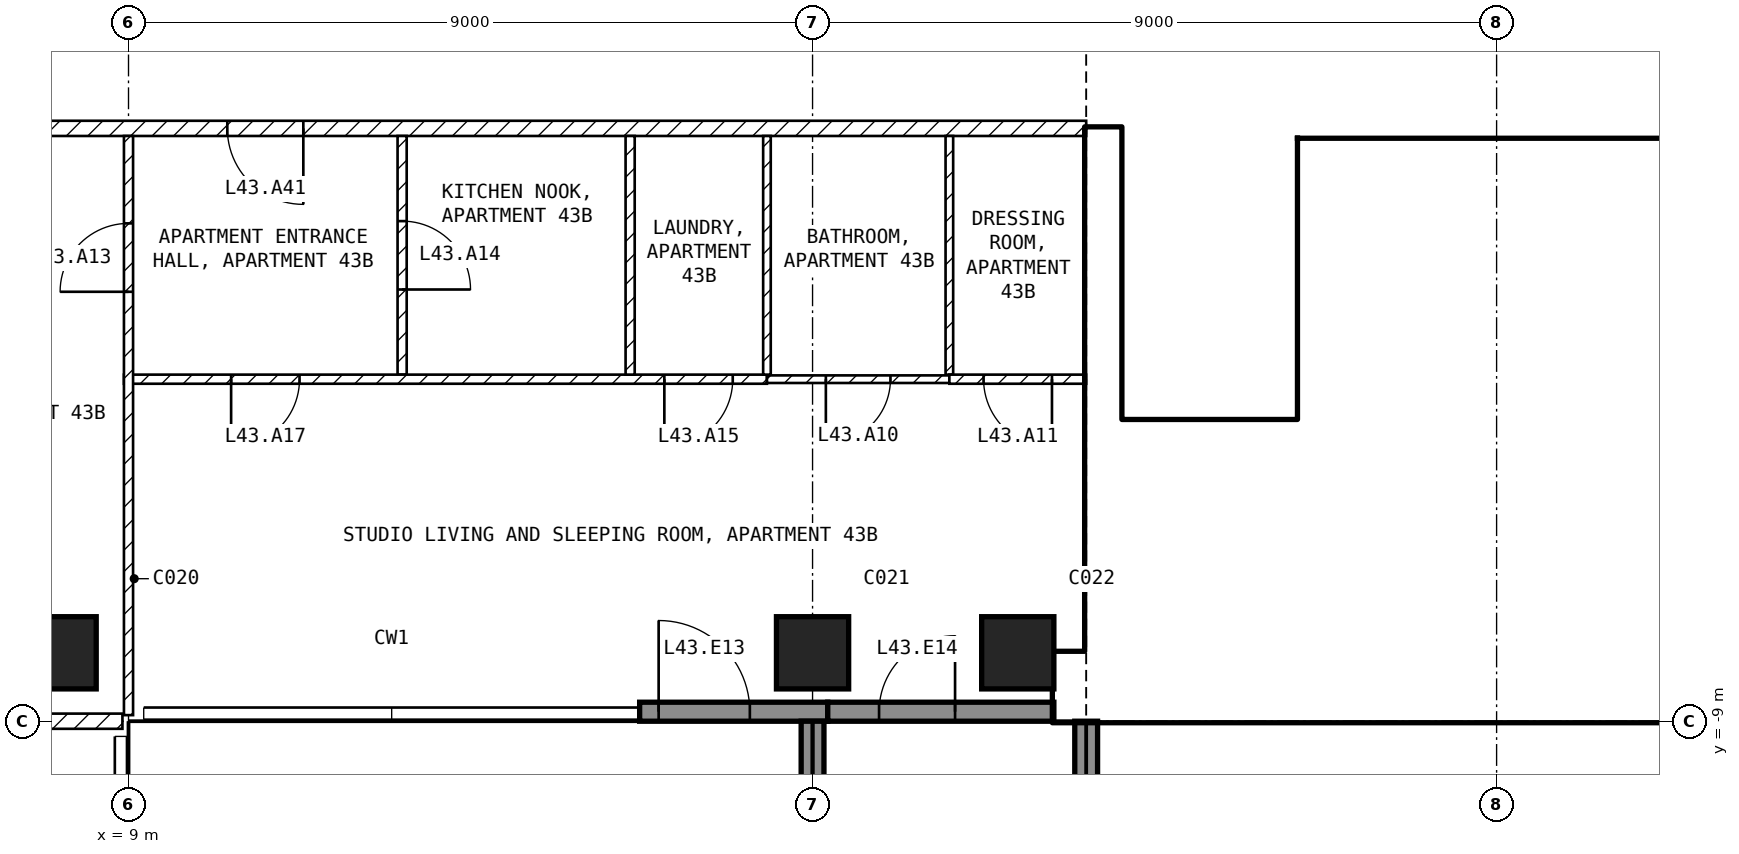
"""IFC4 building model, lengths in metres.
Left out: names, types, materials, properties, quantities, classifications, styles, units other than length and angle.
Written with IfcOpenShell. Run it as: python <this file> out.ifc"""

import sys

from ifc_helpers import new_model, si_unit, direction, frame, frame_2d, origin, origin_2d, place, context, subcontext, project, spatial, rectangle, extrude, element, fill, save


model = new_model("IFC4")
c1 = context("Model", 3, precision=1e-05, world=origin(), true_north=direction((0.0, 1.0)))
c2 = subcontext(c1, "Body", "Model", "MODEL_VIEW")
j1 = project(units=[si_unit("LENGTHUNIT", "METRE"), si_unit("PLANEANGLEUNIT", "RADIAN")], contexts=[c1])
p1 = place(None, origin())
s1 = spatial("IfcSite", under=j1, at=p1, CompositionType="ELEMENT")
p2 = place(p1, origin())
s2 = spatial("IfcBuilding", under=s1, at=p2, CompositionType="ELEMENT")
p3 = place(p2, frame((0.0, 0.0, 177.1)))
s3 = spatial("IfcBuildingStorey", under=s2, at=p3, CompositionType="ELEMENT", Elevation=177.1)
for number, where, z_axis, x_axis in (
    (1, (8.1, -8.1, -0.25), (0.0, 0.0, 1.0), (1.0, 0.0, 0.0)),
    (2, (18.0, -8.1, -0.25), (0.0, 0.0, 1.0), (1.0, 0.0, 0.0)),
    (3, (20.7, -8.1, -0.25), (0.0, 0.0, 1.0), (1.0, 0.0, 0.0)),
):
    element("IfcColumn", number, at=place(p3, frame(where, z_axis=z_axis, x_axis=x_axis)), inside=s3, PredefinedType="COLUMN", context=c2, shape_type="SweptSolid", body=[
        extrude(rectangle(XDim=0.95, YDim=0.95, at=origin_2d()), origin(), (0.0, 0.0, 1.0), 3.5),
    ])
p4 = place(p3, frame((15.725, -8.875, 0.0), z_axis=(0.0, 0.0, 1.0), x_axis=(1.0, 0.0, 0.0)))
e4 = element("IfcWall", 4, at=p4, inside=s3, PredefinedType="SOLIDWALL", context=c2, shape_type="SweptSolid", body=[
    extrude(rectangle(XDim=2.475, YDim=0.25, at=frame_2d((1.237, 0.0))), origin(), (0.0, 0.0, 1.0), 3.25),
])
p5 = place(p4, frame((0.25, 0.0, 0.0)))
e5 = element("IfcOpeningElement", 5, at=p5, cuts=e4, PredefinedType="OPENING", context=c2, shape_type="SweptSolid", body=[
    extrude(rectangle(XDim=1.2, YDim=2.4, at=frame_2d((0.6, 1.2))), frame((0.0, 0.135, 0.0), z_axis=(0.0, -1.0, 0.0), x_axis=(1.0, 0.0, 0.0)), (0.0, 0.0, 1.0), 0.27),
])
p6 = place(p3, frame((18.2, -8.875, 0.0), z_axis=(0.0, 0.0, 1.0), x_axis=(1.0, 0.0, 0.0)))
e6 = element("IfcWall", 6, at=p6, inside=s3, PredefinedType="SOLIDWALL", context=c2, shape_type="SweptSolid", body=[
    extrude(rectangle(XDim=2.975, YDim=0.25, at=frame_2d((1.488, 0.0))), origin(), (0.0, 0.0, 1.0), 3.25),
])
p7 = place(p6, frame((0.675, 0.0, 0.0)))
e7 = element("IfcOpeningElement", 7, at=p7, cuts=e6, PredefinedType="OPENING", context=c2, shape_type="SweptSolid", body=[
    extrude(rectangle(XDim=1.0, YDim=2.4, at=frame_2d((0.5, 1.2))), frame((0.0, 0.135, 0.0), z_axis=(0.0, -1.0, 0.0), x_axis=(1.0, 0.0, 0.0)), (0.0, 0.0, 1.0), 0.27),
])
for number, where, z_axis, x_axis in (
    (8, (18.0, -9.0, 0.0), (0.0, 0.0, 1.0), (0.0, -1.0, 0.0)),
    (9, (21.6, -9.0, 0.0), (0.0, 0.0, 1.0), (0.0, -1.0, 0.0)),
):
    element("IfcWall", number, at=place(p3, frame(where, z_axis=z_axis, x_axis=x_axis)), inside=s3, PredefinedType="SOLIDWALL", context=c2, shape_type="SweptSolid", body=[
        extrude(rectangle(XDim=2.7, YDim=0.3, at=frame_2d((1.35, 0.0))), origin(), (0.0, 0.0, 1.0), 3.25),
    ])
p8 = place(p3, frame((21.175, -8.55, 0.0), z_axis=(0.0, 0.0, 1.0), x_axis=(1.0, 0.0, 0.0)))
e10 = element("IfcWall", 10, at=p8, inside=s3, PredefinedType="SHEAR", context=c2, shape_type="SweptSolid", body=[
    extrude(rectangle(XDim=9.025, YDim=0.9, at=frame_2d((4.512, 0.0))), origin(), (0.0, 0.0, 1.0), 3.25),
])
p9 = place(p3, frame((21.825, -8.1, 0.0), z_axis=(0.0, 0.0, 1.0), x_axis=(0.0, 1.0, 0.0)))
e11 = element("IfcWall", 11, at=p9, inside=s3, PredefinedType="SHEAR", context=c2, shape_type="SweptSolid", body=[
    extrude(rectangle(XDim=6.9, YDim=0.45, at=frame_2d((3.45, 0.0))), origin(), (0.0, 0.0, 1.0), 3.25),
])
p10 = place(p3, frame((24.5, -5.05, 0.0), z_axis=(0.0, 0.0, 1.0), x_axis=(0.0, 1.0, 0.0)))
e12 = element("IfcWall", 12, at=p10, inside=s3, PredefinedType="SOLIDWALL", context=c2, shape_type="SweptSolid", body=[
    extrude(rectangle(XDim=3.7, YDim=0.2, at=frame_2d((1.85, 0.0))), origin(), (0.0, 0.0, 1.0), 3.25),
])
p11 = place(p10, frame((0.1, 0.0, 0.0)))
e13 = element("IfcOpeningElement", 13, at=p11, cuts=e12, PredefinedType="OPENING", context=c2, shape_type="SweptSolid", body=[
    extrude(rectangle(XDim=0.8, YDim=2.1, at=frame_2d((0.4, 1.05))), frame((0.0, 0.11, 0.0), z_axis=(0.0, -1.0, 0.0), x_axis=(1.0, 0.0, 0.0)), (0.0, 0.0, 1.0), 0.22),
])
p12 = place(p3, frame((22.05, -5.15, 0.0), z_axis=(0.0, 0.0, 1.0), x_axis=(1.0, 0.0, 0.0)))
e14 = element("IfcWall", 14, at=p12, inside=s3, PredefinedType="SOLIDWALL", context=c2, shape_type="SweptSolid", body=[
    extrude(rectangle(XDim=6.3, YDim=0.2, at=frame_2d((3.15, 0.0))), origin(), (0.0, 0.0, 1.0), 3.25),
])
p13 = place(p12, frame((0.2, 0.0, 0.0)))
e15 = element("IfcOpeningElement", 15, at=p13, cuts=e14, PredefinedType="OPENING", context=c2, shape_type="SweptSolid", body=[
    extrude(rectangle(XDim=1.0, YDim=2.1, at=frame_2d((0.5, 1.05))), frame((0.0, 0.11, 0.0), z_axis=(0.0, -1.0, 0.0), x_axis=(1.0, 0.0, 0.0)), (0.0, 0.0, 1.0), 0.22),
])
p14 = place(p3, frame((28.25, -8.1, 0.0), z_axis=(0.0, 0.0, 1.0), x_axis=(0.0, 1.0, 0.0)))
e16 = element("IfcWall", 16, at=p14, inside=s3, PredefinedType="SOLIDWALL", context=c2, shape_type="SweptSolid", body=[
    extrude(rectangle(XDim=2.85, YDim=0.2, at=frame_2d((1.425, 0.0))), origin(), (0.0, 0.0, 1.0), 3.25),
])
p15 = place(p3, frame((24.6, -1.45, 0.0), z_axis=(0.0, 0.0, 1.0), x_axis=(1.0, 0.0, 0.0)))
e17 = element("IfcWall", 17, at=p15, inside=s3, PredefinedType="SOLIDWALL", context=c2, shape_type="SweptSolid", body=[
    extrude(rectangle(XDim=8.6, YDim=0.2, at=frame_2d((4.3, 0.0))), origin(), (0.0, 0.0, 1.0), 3.25),
])
p16 = place(p15, frame((0.4, 0.0, 0.0)))
e18 = element("IfcOpeningElement", 18, at=p16, cuts=e17, PredefinedType="OPENING", context=c2, shape_type="SweptSolid", body=[
    extrude(rectangle(XDim=1.0, YDim=2.1, at=frame_2d((0.5, 1.05))), frame((0.0, 0.11, 0.0), z_axis=(0.0, -1.0, 0.0), x_axis=(1.0, 0.0, 0.0)), (0.0, 0.0, 1.0), 0.22),
])
p17 = place(p15, frame((2.4, 0.0, 0.0)))
e19 = element("IfcOpeningElement", 19, at=p17, cuts=e17, PredefinedType="OPENING", context=c2, shape_type="SweptSolid", body=[
    extrude(rectangle(XDim=1.0, YDim=2.1, at=frame_2d((0.5, 1.05))), frame((0.0, 0.11, 0.0), z_axis=(0.0, -1.0, 0.0), x_axis=(1.0, 0.0, 0.0)), (0.0, 0.0, 1.0), 0.22),
])
p18 = place(p15, frame((4.4, 0.0, 0.0)))
e20 = element("IfcOpeningElement", 20, at=p18, cuts=e17, PredefinedType="OPENING", context=c2, shape_type="SweptSolid", body=[
    extrude(rectangle(XDim=1.0, YDim=2.1, at=frame_2d((0.5, 1.05))), frame((0.0, 0.11, 0.0), z_axis=(0.0, -1.0, 0.0), x_axis=(1.0, 0.0, 0.0)), (0.0, 0.0, 1.0), 0.22),
])
p19 = place(p15, frame((6.85, 0.0, 0.0)))
e21 = element("IfcOpeningElement", 21, at=p19, cuts=e17, PredefinedType="OPENING", context=c2, shape_type="SweptSolid", body=[
    extrude(rectangle(XDim=0.9, YDim=2.1, at=frame_2d((0.45, 1.05))), frame((0.0, 0.11, 0.0), z_axis=(0.0, -1.0, 0.0), x_axis=(1.0, 0.0, 0.0)), (0.0, 0.0, 1.0), 0.22),
])
p20 = place(p3, frame((24.6, -3.95, 0.0), z_axis=(0.0, 0.0, 1.0), x_axis=(1.0, 0.0, 0.0)))
e22 = element("IfcWall", 22, at=p20, inside=s3, PredefinedType="SOLIDWALL", context=c2, shape_type="SweptSolid", body=[
    extrude(rectangle(XDim=8.6, YDim=0.2, at=frame_2d((4.3, 0.0))), origin(), (0.0, 0.0, 1.0), 3.25),
])
for number, where, z_axis, x_axis in (
    (23, (26.5, -3.85, 0.0), (0.0, 0.0, 1.0), (0.0, 1.0, 0.0)),
    (24, (28.5, -3.85, 0.0), (0.0, 0.0, 1.0), (0.0, 1.0, 0.0)),
):
    element("IfcWall", number, at=place(p3, frame(where, z_axis=z_axis, x_axis=x_axis)), inside=s3, PredefinedType="SOLIDWALL", context=c2, shape_type="SweptSolid", body=[
        extrude(rectangle(XDim=2.3, YDim=0.2, at=frame_2d((1.15, 0.0))), origin(), (0.0, 0.0, 1.0), 3.25),
    ])
p21 = place(p3, frame((27.4, -5.05, 0.0), z_axis=(0.0, 0.0, 1.0), x_axis=(0.0, 1.0, 0.0)))
e25 = element("IfcWall", 25, at=p21, inside=s3, PredefinedType="PARTITIONING", context=c2, shape_type="SweptSolid", body=[
    extrude(rectangle(XDim=1.0, YDim=0.15, at=frame_2d((0.5, 0.0))), origin(), (0.0, 0.0, 1.0), 3.25),
])
p22 = place(p21, frame((0.1, 0.0, 0.0)))
e26 = element("IfcOpeningElement", 26, at=p22, cuts=e25, PredefinedType="OPENING", context=c2, shape_type="SweptSolid", body=[
    extrude(rectangle(XDim=0.8, YDim=2.1, at=frame_2d((0.4, 1.05))), frame((0.0, 0.085, 0.0), z_axis=(0.0, -1.0, 0.0), x_axis=(1.0, 0.0, 0.0)), (0.0, 0.0, 1.0), 0.17),
])
p23 = place(p3, frame((21.6, -1.2, 0.0), z_axis=(0.0, 0.0, 1.0), x_axis=(-1.0, 0.0, 0.0)))
e27 = element("IfcWall", 27, at=p23, inside=s3, PredefinedType="PARTITIONING", context=c2, shape_type="SweptSolid", body=[
    extrude(rectangle(XDim=17.2, YDim=0.2, at=frame_2d((8.6, 0.0))), origin(), (0.0, 0.0, 1.0), 3.25),
])
p24 = place(p23, frame((10.3, 0.0, 0.0)))
e28 = element("IfcOpeningElement", 28, at=p24, cuts=e27, PredefinedType="OPENING", context=c2, shape_type="SweptSolid", body=[
    extrude(rectangle(XDim=1.0, YDim=2.1, at=frame_2d((0.5, 1.05))), frame((0.0, 0.11, 0.0), z_axis=(0.0, -1.0, 0.0), x_axis=(1.0, 0.0, 0.0)), (0.0, 0.0, 1.0), 0.22),
])
p25 = place(p3, frame((8.92, -9.0, 0.0), z_axis=(0.0, 0.0, 1.0), x_axis=(-1.0, 0.0, 0.0)))
e29 = element("IfcWall", 29, at=p25, inside=s3, PredefinedType="PARTITIONING", context=c2, shape_type="SweptSolid", body=[
    extrude(rectangle(XDim=17.84, YDim=0.2, at=frame_2d((8.92, 0.0))), origin(), (0.0, 0.0, 1.0), 3.25),
])
p26 = place(p25, frame((8.42, 0.0, 0.0)))
e30 = element("IfcOpeningElement", 30, at=p26, cuts=e29, PredefinedType="OPENING", context=c2, shape_type="SweptSolid", body=[
    extrude(rectangle(XDim=1.0, YDim=2.1, at=frame_2d((0.5, 1.05))), frame((0.0, 0.11, 0.0), z_axis=(0.0, -1.0, 0.0), x_axis=(1.0, 0.0, 0.0)), (0.0, 0.0, 1.0), 0.22),
])
p27 = place(p3, frame((12.6, -1.3, 0.0), z_axis=(0.0, 0.0, 1.0), x_axis=(0.0, -1.0, 0.0)))
e31 = element("IfcWall", 31, at=p27, inside=s3, PredefinedType="PARTITIONING", context=c2, shape_type="SweptSolid", body=[
    extrude(rectangle(XDim=3.14, YDim=0.12, at=frame_2d((1.57, 0.0))), origin(), (0.0, 0.0, 1.0), 3.25),
])
p28 = place(p27, frame((1.12, 0.0, 0.0)))
e32 = element("IfcOpeningElement", 32, at=p28, cuts=e31, PredefinedType="OPENING", context=c2, shape_type="SweptSolid", body=[
    extrude(rectangle(XDim=0.9, YDim=2.1, at=frame_2d((0.45, 1.05))), frame((0.0, 0.07, 0.0), z_axis=(0.0, -1.0, 0.0), x_axis=(1.0, 0.0, 0.0)), (0.0, 0.0, 1.0), 0.14),
])
p29 = place(p3, frame((17.4, -4.5, 0.0), z_axis=(0.0, 0.0, 1.0), x_axis=(-1.0, 0.0, 0.0)))
e33 = element("IfcWall", 33, at=p29, inside=s3, PredefinedType="PARTITIONING", context=c2, shape_type="SweptSolid", body=[
    extrude(rectangle(XDim=8.46, YDim=0.12, at=frame_2d((4.23, 0.0))), origin(), (0.0, 0.0, 1.0), 3.25),
])
p30 = place(p29, frame((0.45, 0.0, 0.0)))
e34 = element("IfcOpeningElement", 34, at=p30, cuts=e33, PredefinedType="OPENING", context=c2, shape_type="SweptSolid", body=[
    extrude(rectangle(XDim=0.9, YDim=2.1, at=frame_2d((0.45, 1.05))), frame((0.0, 0.07, 0.0), z_axis=(0.0, -1.0, 0.0), x_axis=(1.0, 0.0, 0.0)), (0.0, 0.0, 1.0), 0.14),
])
p31 = place(p29, frame((6.15, 0.0, 0.0)))
e35 = element("IfcOpeningElement", 35, at=p31, cuts=e33, PredefinedType="OPENING", context=c2, shape_type="SweptSolid", body=[
    extrude(rectangle(XDim=0.9, YDim=2.1, at=frame_2d((0.45, 1.05))), frame((0.0, 0.07, 0.0), z_axis=(0.0, -1.0, 0.0), x_axis=(1.0, 0.0, 0.0)), (0.0, 0.0, 1.0), 0.14),
])
p32 = place(p3, frame((9.0, -8.92, 0.0), z_axis=(0.0, 0.0, 1.0), x_axis=(0.0, 1.0, 0.0)))
e36 = element("IfcWall", 36, at=p32, inside=s3, PredefinedType="PARTITIONING", context=c2, shape_type="SweptSolid", body=[
    extrude(rectangle(XDim=7.62, YDim=0.12, at=frame_2d((3.81, 0.0))), origin(), (0.0, 0.0, 1.0), 3.25),
])
p33 = place(p32, frame((5.57, 0.0, 0.0)))
e37 = element("IfcOpeningElement", 37, at=p33, cuts=e36, PredefinedType="OPENING", context=c2, shape_type="SweptSolid", body=[
    extrude(rectangle(XDim=0.9, YDim=2.1, at=frame_2d((0.45, 1.05))), frame((0.0, 0.07, 0.0), z_axis=(0.0, -1.0, 0.0), x_axis=(1.0, 0.0, 0.0)), (0.0, 0.0, 1.0), 0.14),
])
p34 = place(p3, frame((15.6, -1.3, 0.0), z_axis=(0.0, 0.0, 1.0), x_axis=(0.0, -1.0, 0.0)))
e38 = element("IfcWall", 38, at=p34, inside=s3, PredefinedType="PARTITIONING", context=c2, shape_type="SweptSolid", body=[
    extrude(rectangle(XDim=3.14, YDim=0.12, at=frame_2d((1.57, 0.0))), origin(), (0.0, 0.0, 1.0), 3.25),
])
for number, where, z_axis, x_axis in (
    (39, (17.4, -1.3, 0.0), (0.0, 0.0, 1.0), (0.0, -1.0, 0.0)),
    (40, (19.8, -1.3, 0.0), (0.0, 0.0, 1.0), (0.0, -1.0, 0.0)),
):
    element("IfcWall", number, at=place(p3, frame(where, z_axis=z_axis, x_axis=x_axis)), inside=s3, PredefinedType="PARTITIONING", context=c2, shape_type="SweptSolid", body=[
        extrude(rectangle(XDim=3.14, YDim=0.1, at=frame_2d((1.57, 0.0))), origin(), (0.0, 0.0, 1.0), 3.25),
    ])
p35 = place(p3, frame((19.8, -4.5, 0.0), z_axis=(0.0, 0.0, 1.0), x_axis=(-1.0, 0.0, 0.0)))
e41 = element("IfcWall", 41, at=p35, inside=s3, PredefinedType="PARTITIONING", context=c2, shape_type="SweptSolid", body=[
    extrude(rectangle(XDim=2.4, YDim=0.1, at=frame_2d((1.2, 0.0))), origin(), (0.0, 0.0, 1.0), 3.25),
])
p36 = place(p35, frame((0.775, 0.0, 0.0)))
e42 = element("IfcOpeningElement", 42, at=p36, cuts=e41, PredefinedType="OPENING", context=c2, shape_type="SweptSolid", body=[
    extrude(rectangle(XDim=0.85, YDim=2.1, at=frame_2d((0.425, 1.05))), frame((0.0, 0.06, 0.0), z_axis=(0.0, -1.0, 0.0), x_axis=(1.0, 0.0, 0.0)), (0.0, 0.0, 1.0), 0.12),
])
p37 = place(p3, frame((21.6, -4.5, 0.0), z_axis=(0.0, 0.0, 1.0), x_axis=(-1.0, 0.0, 0.0)))
e43 = element("IfcWall", 43, at=p37, inside=s3, PredefinedType="PARTITIONING", context=c2, shape_type="SweptSolid", body=[
    extrude(rectangle(XDim=1.8, YDim=0.12, at=frame_2d((0.9, 0.0))), origin(), (0.0, 0.0, 1.0), 3.25),
])
p38 = place(p37, frame((0.45, 0.0, 0.0)))
e44 = element("IfcOpeningElement", 44, at=p38, cuts=e43, PredefinedType="OPENING", context=c2, shape_type="SweptSolid", body=[
    extrude(rectangle(XDim=0.9, YDim=2.1, at=frame_2d((0.45, 1.05))), frame((0.0, 0.07, 0.0), z_axis=(0.0, -1.0, 0.0), x_axis=(1.0, 0.0, 0.0)), (0.0, 0.0, 1.0), 0.14),
])
p39 = place(p5, origin())
e45 = element("IfcDoor", 45, at=p39, inside=s3, OperationType="SINGLE_SWING_LEFT", PredefinedType="DOOR", context=c2, shape_type="SweptSolid", body=[
    extrude(rectangle(XDim=1.2, YDim=2.4, at=frame_2d((0.6, 1.2))), frame((0.0, 0.025, 0.0), z_axis=(0.0, -1.0, 0.0), x_axis=(1.0, 0.0, 0.0)), (0.0, 0.0, 1.0), 0.05),
])
fill(e5, e45)
p40 = place(p7, origin())
e46 = element("IfcDoor", 46, at=p40, inside=s3, OperationType="SINGLE_SWING_RIGHT", PredefinedType="DOOR", context=c2, shape_type="SweptSolid", body=[
    extrude(rectangle(XDim=1.0, YDim=2.4, at=frame_2d((0.5, 1.2))), frame((0.0, 0.025, 0.0), z_axis=(0.0, -1.0, 0.0), x_axis=(1.0, 0.0, 0.0)), (0.0, 0.0, 1.0), 0.05),
])
fill(e7, e46)
p41 = place(p16, origin())
e47 = element("IfcDoor", 47, at=p41, inside=s3, OperationType="DOUBLE_DOOR_SLIDING", PredefinedType="DOOR", context=c2, shape_type="SweptSolid", body=[
    extrude(rectangle(XDim=1.0, YDim=2.1, at=frame_2d((0.5, 1.05))), frame((0.0, 0.025, 0.0), z_axis=(0.0, -1.0, 0.0), x_axis=(1.0, 0.0, 0.0)), (0.0, 0.0, 1.0), 0.05),
])
fill(e18, e47)
p42 = place(p17, origin())
e48 = element("IfcDoor", 48, at=p42, inside=s3, OperationType="DOUBLE_DOOR_SLIDING", PredefinedType="DOOR", context=c2, shape_type="SweptSolid", body=[
    extrude(rectangle(XDim=1.0, YDim=2.1, at=frame_2d((0.5, 1.05))), frame((0.0, 0.025, 0.0), z_axis=(0.0, -1.0, 0.0), x_axis=(1.0, 0.0, 0.0)), (0.0, 0.0, 1.0), 0.05),
])
fill(e19, e48)
p43 = place(p18, origin())
e49 = element("IfcDoor", 49, at=p43, inside=s3, OperationType="DOUBLE_DOOR_SLIDING", PredefinedType="DOOR", context=c2, shape_type="SweptSolid", body=[
    extrude(rectangle(XDim=1.0, YDim=2.1, at=frame_2d((0.5, 1.05))), frame((0.0, 0.025, 0.0), z_axis=(0.0, -1.0, 0.0), x_axis=(1.0, 0.0, 0.0)), (0.0, 0.0, 1.0), 0.05),
])
fill(e20, e49)
p44 = place(p13, origin())
e50 = element("IfcDoor", 50, at=p44, inside=s3, OperationType="SINGLE_SWING_LEFT", PredefinedType="DOOR", context=c2, shape_type="SweptSolid", body=[
    extrude(rectangle(XDim=1.0, YDim=2.1, at=frame_2d((0.5, 1.05))), frame((0.0, 0.025, 0.0), z_axis=(0.0, -1.0, 0.0), x_axis=(1.0, 0.0, 0.0)), (0.0, 0.0, 1.0), 0.05),
])
fill(e15, e50)
p45 = place(p11, origin())
e51 = element("IfcDoor", 51, at=p45, inside=s3, OperationType="SINGLE_SWING_LEFT", PredefinedType="DOOR", context=c2, shape_type="SweptSolid", body=[
    extrude(rectangle(XDim=0.8, YDim=2.1, at=frame_2d((0.4, 1.05))), frame((0.0, 0.025, 0.0), z_axis=(0.0, -1.0, 0.0), x_axis=(1.0, 0.0, 0.0)), (0.0, 0.0, 1.0), 0.05),
])
fill(e13, e51)
p46 = place(p22, origin())
e52 = element("IfcDoor", 52, at=p46, inside=s3, OperationType="SINGLE_SWING_LEFT", PredefinedType="DOOR", context=c2, shape_type="SweptSolid", body=[
    extrude(rectangle(XDim=0.8, YDim=2.1, at=frame_2d((0.4, 1.05))), frame((0.0, 0.025, 0.0), z_axis=(0.0, -1.0, 0.0), x_axis=(1.0, 0.0, 0.0)), (0.0, 0.0, 1.0), 0.05),
])
fill(e26, e52)
p47 = place(p36, origin())
e53 = element("IfcDoor", 53, at=p47, inside=s3, OperationType="SINGLE_SWING_RIGHT", PredefinedType="DOOR", context=c2, shape_type="SweptSolid", body=[
    extrude(rectangle(XDim=0.85, YDim=2.1, at=frame_2d((0.425, 1.05))), frame((0.0, 0.025, 0.0), z_axis=(0.0, -1.0, 0.0), x_axis=(1.0, 0.0, 0.0)), (0.0, 0.0, 1.0), 0.05),
])
fill(e42, e53)
p48 = place(p38, origin())
e54 = element("IfcDoor", 54, at=p48, inside=s3, OperationType="SINGLE_SWING_LEFT", PredefinedType="DOOR", context=c2, shape_type="SweptSolid", body=[
    extrude(rectangle(XDim=0.9, YDim=2.1, at=frame_2d((0.45, 1.05))), frame((0.0, 0.025, 0.0), z_axis=(0.0, -1.0, 0.0), x_axis=(1.0, 0.0, 0.0)), (0.0, 0.0, 1.0), 0.05),
])
fill(e44, e54)
p49 = place(p33, origin())
e55 = element("IfcDoor", 55, at=p49, inside=s3, OperationType="SINGLE_SWING_LEFT", PredefinedType="DOOR", context=c2, shape_type="SweptSolid", body=[
    extrude(rectangle(XDim=0.9, YDim=2.1, at=frame_2d((0.45, 1.05))), frame((0.0, 0.025, 0.0), z_axis=(0.0, -1.0, 0.0), x_axis=(1.0, 0.0, 0.0)), (0.0, 0.0, 1.0), 0.05),
])
fill(e37, e55)
p50 = place(p28, origin())
e56 = element("IfcDoor", 56, at=p50, inside=s3, OperationType="SINGLE_SWING_RIGHT", PredefinedType="DOOR", context=c2, shape_type="SweptSolid", body=[
    extrude(rectangle(XDim=0.9, YDim=2.1, at=frame_2d((0.45, 1.05))), frame((0.0, 0.025, 0.0), z_axis=(0.0, -1.0, 0.0), x_axis=(1.0, 0.0, 0.0)), (0.0, 0.0, 1.0), 0.05),
])
fill(e32, e56)
p51 = place(p30, origin())
e57 = element("IfcDoor", 57, at=p51, inside=s3, OperationType="SINGLE_SWING_RIGHT", PredefinedType="DOOR", context=c2, shape_type="SweptSolid", body=[
    extrude(rectangle(XDim=0.9, YDim=2.1, at=frame_2d((0.45, 1.05))), frame((0.0, 0.025, 0.0), z_axis=(0.0, -1.0, 0.0), x_axis=(1.0, 0.0, 0.0)), (0.0, 0.0, 1.0), 0.05),
])
fill(e34, e57)
p52 = place(p31, origin())
e58 = element("IfcDoor", 58, at=p52, inside=s3, OperationType="SINGLE_SWING_RIGHT", PredefinedType="DOOR", context=c2, shape_type="SweptSolid", body=[
    extrude(rectangle(XDim=0.9, YDim=2.1, at=frame_2d((0.45, 1.05))), frame((0.0, 0.025, 0.0), z_axis=(0.0, -1.0, 0.0), x_axis=(1.0, 0.0, 0.0)), (0.0, 0.0, 1.0), 0.05),
])
fill(e35, e58)
p53 = place(p24, origin())
e59 = element("IfcDoor", 59, at=p53, inside=s3, OperationType="SINGLE_SWING_LEFT", PredefinedType="DOOR", context=c2, shape_type="SweptSolid", body=[
    extrude(rectangle(XDim=1.0, YDim=2.1, at=frame_2d((0.5, 1.05))), frame((0.0, 0.025, 0.0), z_axis=(0.0, -1.0, 0.0), x_axis=(1.0, 0.0, 0.0)), (0.0, 0.0, 1.0), 0.05),
])
fill(e28, e59)
save(model, sys.argv[1])
